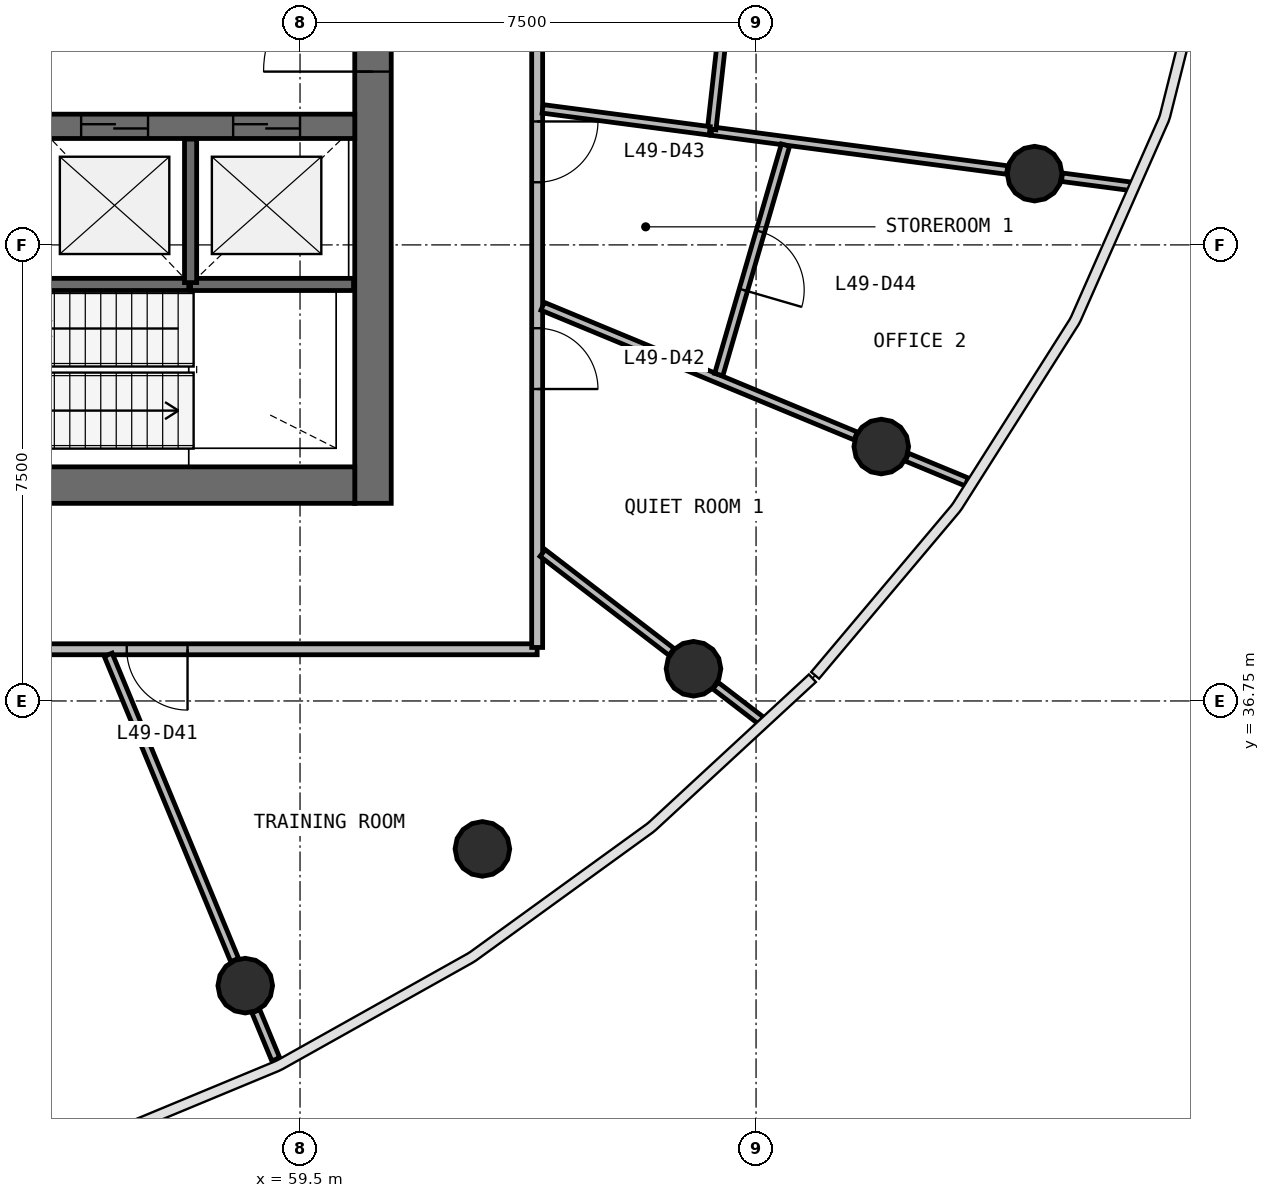
"""IFC4 building model, lengths in metres.
Left out: names, types, materials, properties, quantities, classifications, styles, units other than length and angle.
Written with IfcOpenShell. Run it as: python <this file> out.ifc"""

import sys

from ifc_helpers import new_model, si_unit, direction, frame, frame_2d, origin, origin_2d, place, context, subcontext, project, spatial, rectangle, circle, extrude, source, transform, mapped, element, fill, save


model = new_model("IFC4")
c1 = context("Model", 3, precision=1e-05, world=origin(), true_north=direction((0.0, 1.0)))
c2 = subcontext(c1, "Body", "Model", "MODEL_VIEW")
j1 = project(units=[si_unit("LENGTHUNIT", "METRE"), si_unit("PLANEANGLEUNIT", "RADIAN")], contexts=[c1])
p1 = place(None, origin())
s1 = spatial("IfcSite", under=j1, at=p1, CompositionType="ELEMENT")
p2 = place(p1, origin())
s2 = spatial("IfcBuilding", under=s1, at=p2, CompositionType="ELEMENT")
p3 = place(p2, frame((0.0, 0.0, 203.3)))
s3 = spatial("IfcBuildingStorey", under=s2, at=p3, CompositionType="ELEMENT", Elevation=203.3)
p4 = place(p3, frame((60.7, 40.0, 0.0), z_axis=(0.0, 0.0, 1.0), x_axis=(0.0, 1.0, 0.0)))
e1 = element("IfcWall", 1, at=p4, inside=s3, PredefinedType="SHEAR", context=c2, shape_type="SweptSolid", body=[
    extrude(rectangle(XDim=16.0, YDim=0.6, at=frame_2d((8.0, 0.0))), origin(), (0.0, 0.0, 1.0), 3.9),
])
p5 = place(p4, frame((7.1, 0.0, 0.0)))
e2 = element("IfcOpeningElement", 2, at=p5, cuts=e1, PredefinedType="OPENING", context=c2, shape_type="SweptSolid", body=[
    extrude(rectangle(XDim=1.8, YDim=2.1, at=frame_2d((0.9, 1.05))), frame((0.0, 0.31, 0.0), z_axis=(0.0, -1.0, 0.0), x_axis=(1.0, 0.0, 0.0)), (0.0, 0.0, 1.0), 0.62),
])
p6 = place(p3, frame((43.6, 40.3, 0.0), z_axis=(0.0, 0.0, 1.0), x_axis=(1.0, 0.0, 0.0)))
e3 = element("IfcWall", 3, at=p6, inside=s3, PredefinedType="SHEAR", context=c2, shape_type="SweptSolid", body=[
    extrude(rectangle(XDim=16.8, YDim=0.6, at=frame_2d((8.4, 0.0))), origin(), (0.0, 0.0, 1.0), 3.9),
])
p7 = place(p6, frame((10.3, 0.0, 0.0)))
e4 = element("IfcOpeningElement", 4, at=p7, cuts=e3, PredefinedType="OPENING", context=c2, shape_type="SweptSolid", body=[
    extrude(rectangle(XDim=1.2, YDim=2.1, at=frame_2d((0.6, 1.05))), frame((0.0, 0.31, 0.0), z_axis=(0.0, -1.0, 0.0), x_axis=(1.0, 0.0, 0.0)), (0.0, 0.0, 1.0), 0.62),
])
p8 = place(p6, frame((7.25, 0.0, 0.0)))
e5 = element("IfcOpeningElement", 5, at=p8, cuts=e3, PredefinedType="OPENING", context=c2, shape_type="SweptSolid", body=[
    extrude(rectangle(XDim=1.1, YDim=2.1, at=frame_2d((0.55, 1.05))), frame((0.0, 0.31, 0.0), z_axis=(0.0, -1.0, 0.0), x_axis=(1.0, 0.0, 0.0)), (0.0, 0.0, 1.0), 0.62),
])
p9 = place(p6, frame((0.7, 0.0, 0.0)))
e6 = element("IfcOpeningElement", 6, at=p9, cuts=e3, PredefinedType="OPENING", context=c2, shape_type="SweptSolid", body=[
    extrude(rectangle(XDim=0.8, YDim=2.1, at=frame_2d((0.4, 1.05))), frame((0.0, 0.31, 0.0), z_axis=(0.0, -1.0, 0.0), x_axis=(1.0, 0.0, 0.0)), (0.0, 0.0, 1.0), 0.62),
])
p10 = place(p3, frame((43.6, 46.2, 0.0), z_axis=(0.0, 0.0, 1.0), x_axis=(1.0, 0.0, 0.0)))
e7 = element("IfcWall", 7, at=p10, inside=s3, PredefinedType="SHEAR", context=c2, shape_type="SweptSolid", body=[
    extrude(rectangle(XDim=16.8, YDim=0.4, at=frame_2d((8.4, 0.0))), origin(), (0.0, 0.0, 1.0), 3.9),
])
p11 = place(p10, frame((9.8, 0.0, 0.0)))
e8 = element("IfcOpeningElement", 8, at=p11, cuts=e7, PredefinedType="OPENING", context=c2, shape_type="SweptSolid", body=[
    extrude(rectangle(XDim=1.1, YDim=2.1, at=frame_2d((0.55, 1.05))), frame((0.0, 0.21, 0.0), z_axis=(0.0, -1.0, 0.0), x_axis=(1.0, 0.0, 0.0)), (0.0, 0.0, 1.0), 0.42),
])
p12 = place(p10, frame((12.3, 0.0, 0.0)))
e9 = element("IfcOpeningElement", 9, at=p12, cuts=e7, PredefinedType="OPENING", context=c2, shape_type="SweptSolid", body=[
    extrude(rectangle(XDim=1.1, YDim=2.1, at=frame_2d((0.55, 1.05))), frame((0.0, 0.21, 0.0), z_axis=(0.0, -1.0, 0.0), x_axis=(1.0, 0.0, 0.0)), (0.0, 0.0, 1.0), 0.42),
])
p13 = place(p10, frame((14.8, 0.0, 0.0)))
e10 = element("IfcOpeningElement", 10, at=p13, cuts=e7, PredefinedType="OPENING", context=c2, shape_type="SweptSolid", body=[
    extrude(rectangle(XDim=1.1, YDim=2.1, at=frame_2d((0.55, 1.05))), frame((0.0, 0.21, 0.0), z_axis=(0.0, -1.0, 0.0), x_axis=(1.0, 0.0, 0.0)), (0.0, 0.0, 1.0), 0.42),
])
p14 = place(p10, frame((2.45, 0.0, 0.0)))
e11 = element("IfcOpeningElement", 11, at=p14, cuts=e7, PredefinedType="OPENING", context=c2, shape_type="SweptSolid", body=[
    extrude(rectangle(XDim=0.9, YDim=2.1, at=frame_2d((0.45, 1.05))), frame((0.0, 0.21, 0.0), z_axis=(0.0, -1.0, 0.0), x_axis=(1.0, 0.0, 0.0)), (0.0, 0.0, 1.0), 0.42),
])
p15 = place(p10, frame((7.85, 0.0, 0.0)))
e12 = element("IfcOpeningElement", 12, at=p15, cuts=e7, PredefinedType="OPENING", context=c2, shape_type="SweptSolid", body=[
    extrude(rectangle(XDim=0.9, YDim=2.1, at=frame_2d((0.45, 1.05))), frame((0.0, 0.21, 0.0), z_axis=(0.0, -1.0, 0.0), x_axis=(1.0, 0.0, 0.0)), (0.0, 0.0, 1.0), 0.42),
])
m1 = source(origin(), c2, "Body", "SweptSolid", [
    extrude(circle(Radius=0.45, at=origin_2d()), origin(), (0.0, 0.0, 1.0), 3.9),
])
for number, where, z_axis, x_axis in (
    (13, (58.599, 32.069, 0.0), (0.0, 0.0, 1.0), (1.0, 0.0, 0.0)),
    (14, (62.499, 34.317, 0.0), (0.0, 0.0, 1.0), (1.0, 0.0, 0.0)),
    (15, (65.971, 37.28, 0.0), (0.0, 0.0, 1.0), (1.0, 0.0, 0.0)),
    (16, (69.059, 40.934, 0.0), (0.0, 0.0, 1.0), (1.0, 0.0, 0.0)),
    (17, (71.581, 45.422, 0.0), (0.0, 0.0, 1.0), (1.0, 0.0, 0.0)),
):
    element("IfcColumn", number, at=place(p3, frame(where, z_axis=z_axis, x_axis=x_axis)), inside=s3, PredefinedType="COLUMN", context=c2, shape_type="MappedRepresentation", body=[
        mapped(m1, transform((0.0, 0.0, 0.0), scale=1.0)),
    ])
p16 = place(p3, frame((57.7, 43.6, 0.0), z_axis=(0.0, 0.0, 1.0), x_axis=(1.0, 0.0, 0.0)))
e18 = element("IfcWall", 18, at=p16, inside=s3, PredefinedType="SOLIDWALL", context=c2, shape_type="SweptSolid", body=[
    extrude(rectangle(XDim=2.68, YDim=0.2, at=frame_2d((1.34, 0.0))), origin(), (0.0, 0.0, 1.0), 3.58),
])
p17 = place(p3, frame((55.2, 43.6, 0.0), z_axis=(0.0, 0.0, 1.0), x_axis=(1.0, 0.0, 0.0)))
e19 = element("IfcWall", 19, at=p17, inside=s3, PredefinedType="SOLIDWALL", context=c2, shape_type="SweptSolid", body=[
    extrude(rectangle(XDim=2.47, YDim=0.2, at=frame_2d((1.235, 0.0))), origin(), (0.0, 0.0, 1.0), 3.58),
])
p18 = place(p3, frame((57.7, 43.63, 0.0), z_axis=(0.0, 0.0, 1.0), x_axis=(0.0, 1.0, 0.0)))
e20 = element("IfcWall", 20, at=p18, inside=s3, PredefinedType="SOLIDWALL", context=c2, shape_type="SweptSolid", body=[
    extrude(rectangle(XDim=2.36, YDim=0.2, at=frame_2d((1.18, 0.0))), origin(), (0.0, 0.0, 1.0), 3.58),
])
p19 = place(p3, frame((63.4, 37.6, 0.0), z_axis=(0.0, 0.0, 1.0), x_axis=(-1.0, 0.0, 0.0)))
e21 = element("IfcWall", 21, at=p19, inside=s3, PredefinedType="PARTITIONING", context=c2, shape_type="SweptSolid", body=[
    extrude(rectangle(XDim=22.8, YDim=0.18, at=frame_2d((11.4, 0.0))), origin(), (0.0, 0.0, 1.0), 2.88),
])
p20 = place(p19, frame((12.95, 0.0, 0.0)))
e22 = element("IfcOpeningElement", 22, at=p20, cuts=e21, PredefinedType="OPENING", context=c2, shape_type="SweptSolid", body=[
    extrude(rectangle(XDim=1.0, YDim=2.1, at=frame_2d((0.5, 1.05))), frame((0.0, 0.1, 0.0), z_axis=(0.0, -1.0, 0.0), x_axis=(1.0, 0.0, 0.0)), (0.0, 0.0, 1.0), 0.2),
])
p21 = place(p19, frame((10.95, 0.0, 0.0)))
e23 = element("IfcOpeningElement", 23, at=p21, cuts=e21, PredefinedType="OPENING", context=c2, shape_type="SweptSolid", body=[
    extrude(rectangle(XDim=1.0, YDim=2.1, at=frame_2d((0.5, 1.05))), frame((0.0, 0.1, 0.0), z_axis=(0.0, -1.0, 0.0), x_axis=(1.0, 0.0, 0.0)), (0.0, 0.0, 1.0), 0.2),
])
p22 = place(p19, frame((5.75, 0.0, 0.0)))
e24 = element("IfcOpeningElement", 24, at=p22, cuts=e21, PredefinedType="OPENING", context=c2, shape_type="SweptSolid", body=[
    extrude(rectangle(XDim=1.0, YDim=2.1, at=frame_2d((0.5, 1.05))), frame((0.0, 0.1, 0.0), z_axis=(0.0, -1.0, 0.0), x_axis=(1.0, 0.0, 0.0)), (0.0, 0.0, 1.0), 0.2),
])
p23 = place(p3, frame((63.4, 58.37, 0.0), z_axis=(0.0, 0.0, 1.0), x_axis=(0.0, -1.0, 0.0)))
e25 = element("IfcWall", 25, at=p23, inside=s3, PredefinedType="PARTITIONING", context=c2, shape_type="SweptSolid", body=[
    extrude(rectangle(XDim=20.74, YDim=0.18, at=frame_2d((10.37, 0.0))), origin(), (0.0, 0.0, 1.0), 2.88),
])
p24 = place(p23, frame((9.99, 0.0, 0.0)))
e26 = element("IfcOpeningElement", 26, at=p24, cuts=e25, PredefinedType="OPENING", context=c2, shape_type="SweptSolid", body=[
    extrude(rectangle(XDim=0.9, YDim=2.1, at=frame_2d((0.45, 1.05))), frame((0.0, 0.1, 0.0), z_axis=(0.0, -1.0, 0.0), x_axis=(1.0, 0.0, 0.0)), (0.0, 0.0, 1.0), 0.2),
])
p25 = place(p23, frame((7.79, 0.0, 0.0)))
e27 = element("IfcOpeningElement", 27, at=p25, cuts=e25, PredefinedType="OPENING", context=c2, shape_type="SweptSolid", body=[
    extrude(rectangle(XDim=0.9, YDim=2.1, at=frame_2d((0.45, 1.05))), frame((0.0, 0.1, 0.0), z_axis=(0.0, -1.0, 0.0), x_axis=(1.0, 0.0, 0.0)), (0.0, 0.0, 1.0), 0.2),
])
p26 = place(p23, frame((4.29, 0.0, 0.0)))
e28 = element("IfcOpeningElement", 28, at=p26, cuts=e25, PredefinedType="OPENING", context=c2, shape_type="SweptSolid", body=[
    extrude(rectangle(XDim=1.0, YDim=2.1, at=frame_2d((0.5, 1.05))), frame((0.0, 0.1, 0.0), z_axis=(0.0, -1.0, 0.0), x_axis=(1.0, 0.0, 0.0)), (0.0, 0.0, 1.0), 0.2),
])
p27 = place(p23, frame((15.49, 0.0, 0.0)))
e29 = element("IfcOpeningElement", 29, at=p27, cuts=e25, PredefinedType="OPENING", context=c2, shape_type="SweptSolid", body=[
    extrude(rectangle(XDim=1.0, YDim=2.1, at=frame_2d((0.5, 1.05))), frame((0.0, 0.1, 0.0), z_axis=(0.0, -1.0, 0.0), x_axis=(1.0, 0.0, 0.0)), (0.0, 0.0, 1.0), 0.2),
])
p28 = place(p23, frame((12.09, 0.0, 0.0)))
e30 = element("IfcOpeningElement", 30, at=p28, cuts=e25, PredefinedType="OPENING", context=c2, shape_type="SweptSolid", body=[
    extrude(rectangle(XDim=1.0, YDim=2.1, at=frame_2d((0.5, 1.05))), frame((0.0, 0.1, 0.0), z_axis=(0.0, -1.0, 0.0), x_axis=(1.0, 0.0, 0.0)), (0.0, 0.0, 1.0), 0.2),
])
p29 = place(p3, frame((68.639, 41.108, 0.0), z_axis=(0.0, 0.0, 1.0), x_axis=(-0.9238758778, 0.382692255499, 0.0)))
e31 = element("IfcWall", 31, at=p29, inside=s3, PredefinedType="PARTITIONING", context=c2, shape_type="SweptSolid", body=[
    extrude(rectangle(XDim=5.573, YDim=0.14, at=frame_2d((2.787, 0.0))), origin(), (0.0, 0.0, 1.0), 2.88),
])
p30 = place(p3, frame((56.345, 37.51, 0.0), z_axis=(0.0, 0.0, 1.0), x_axis=(0.382655972885, -0.923890906122, 0.0)))
e32 = element("IfcWall", 32, at=p30, inside=s3, PredefinedType="PARTITIONING", context=c2, shape_type="SweptSolid", body=[
    extrude(rectangle(XDim=5.435, YDim=0.14, at=frame_2d((2.717, 0.0))), origin(), (0.0, 0.0, 1.0), 2.88),
])
p31 = place(p3, frame((66.267, 46.122, 0.0), z_axis=(0.0, 0.0, 1.0), x_axis=(0.991448195842, -0.130500861923, 0.0)))
e33 = element("IfcWall", 33, at=p31, inside=s3, PredefinedType="PARTITIONING", context=c2, shape_type="SweptSolid", body=[
    extrude(rectangle(XDim=4.905, YDim=0.14, at=frame_2d((2.453, 0.0))), origin(), (0.0, 0.0, 1.0), 2.88),
])
p32 = place(p3, frame((67.484, 45.891, 0.0), z_axis=(0.0, 0.0, 1.0), x_axis=(-0.279262901939, -0.960214679955, 0.0)))
e34 = element("IfcWall", 34, at=p32, inside=s3, PredefinedType="PARTITIONING", context=c2, shape_type="SweptSolid", body=[
    extrude(rectangle(XDim=3.931, YDim=0.14, at=frame_2d((1.965, 0.0))), origin(), (0.0, 0.0, 1.0), 2.88),
])
p33 = place(p32, frame((1.481, 0.0, 0.0)))
e35 = element("IfcOpeningElement", 35, at=p33, cuts=e34, PredefinedType="OPENING", context=c2, shape_type="SweptSolid", body=[
    extrude(rectangle(XDim=1.0, YDim=2.1, at=frame_2d((0.5, 1.05))), frame((0.0, 0.08, 0.0), z_axis=(0.0, -1.0, 0.0), x_axis=(1.0, 0.0, 0.0)), (0.0, 0.0, 1.0), 0.16),
])
p34 = place(p3, frame((66.271, 46.152, 0.0), z_axis=(0.0, 0.0, 1.0), x_axis=(0.111758070994, 0.993735444456, 0.0)))
e36 = element("IfcWall", 36, at=p34, inside=s3, PredefinedType="PARTITIONING", context=c2, shape_type="SweptSolid", body=[
    extrude(rectangle(XDim=3.777, YDim=0.14, at=frame_2d((1.889, 0.0))), origin(), (0.0, 0.0, 1.0), 2.88),
])
p35 = place(p3, frame((63.49, 46.487, 0.0), z_axis=(0.0, 0.0, 1.0), x_axis=(0.991438994906, -0.13057074473, 0.0)))
e37 = element("IfcWall", 37, at=p35, inside=s3, PredefinedType="PARTITIONING", context=c2, shape_type="SweptSolid", body=[
    extrude(rectangle(XDim=2.771, YDim=0.14, at=frame_2d((1.385, 0.0))), origin(), (0.0, 0.0, 1.0), 2.88),
])
p36 = place(p3, frame((63.49, 39.183, 0.0), z_axis=(0.0, 0.0, 1.0), x_axis=(0.793363703091, -0.608747923707, 0.0)))
e38 = element("IfcWall", 38, at=p36, inside=s3, PredefinedType="PARTITIONING", context=c2, shape_type="SweptSolid", body=[
    extrude(rectangle(XDim=2.673, YDim=0.14, at=frame_2d((1.336, 0.0))), origin(), (0.0, 0.0, 1.0), 2.88),
])
p37 = place(p3, frame((72.031, 45.363, 0.0), z_axis=(0.0, 0.0, 1.0), x_axis=(0.99143621724, -0.130591834141, 0.0)))
e39 = element("IfcWall", 39, at=p37, inside=s3, PredefinedType="PARTITIONING", context=c2, shape_type="SweptSolid", body=[
    extrude(rectangle(XDim=1.15, YDim=0.14, at=frame_2d((0.575, 0.0))), origin(), (0.0, 0.0, 1.0), 2.88),
])
p38 = place(p3, frame((70.464, 40.352, 0.0), z_axis=(0.0, 0.0, 1.0), x_axis=(-0.923921911664, 0.382581104012, 0.0)))
e40 = element("IfcWall", 40, at=p38, inside=s3, PredefinedType="PARTITIONING", context=c2, shape_type="SweptSolid", body=[
    extrude(rectangle(XDim=1.066, YDim=0.14, at=frame_2d((0.533, 0.0))), origin(), (0.0, 0.0, 1.0), 2.88),
])
p39 = place(p3, frame((66.332, 37.003, 0.0), z_axis=(0.0, 0.0, 1.0), x_axis=(0.793344167197, -0.608773383431, 0.0)))
e41 = element("IfcWall", 41, at=p39, inside=s3, PredefinedType="PARTITIONING", context=c2, shape_type="SweptSolid", body=[
    extrude(rectangle(XDim=0.944, YDim=0.14, at=frame_2d((0.472, 0.0))), origin(), (0.0, 0.0, 1.0), 2.88),
])
p40 = place(p3, frame((58.773, 31.648, 0.0), z_axis=(0.0, 0.0, 1.0), x_axis=(0.382754217383, -0.92385020922, 0.0)))
e42 = element("IfcWall", 42, at=p40, inside=s3, PredefinedType="PARTITIONING", context=c2, shape_type="SweptSolid", body=[
    extrude(rectangle(XDim=0.857, YDim=0.14, at=frame_2d((0.429, 0.0))), origin(), (0.0, 0.0, 1.0), 2.88),
])
m2 = source(origin(), c2, "Body", "SweptSolid", [
    extrude(rectangle(XDim=1.8, YDim=2.1, at=frame_2d((0.9, 1.05))), frame((0.0, 0.025, 0.0), z_axis=(0.0, -1.0, 0.0), x_axis=(1.0, 0.0, 0.0)), (0.0, 0.0, 1.0), 0.05),
])
p41 = place(p5, origin())
e43 = element("IfcDoor", 43, at=p41, inside=s3, OperationType="SINGLE_SWING_LEFT", PredefinedType="DOOR", context=c2, shape_type="MappedRepresentation", body=[
    mapped(m2, transform((0.0, 0.0, 0.0), scale=1.0)),
])
fill(e2, e43)
m3 = source(origin(), c2, "Body", "SweptSolid", [
    extrude(rectangle(XDim=1.1, YDim=2.1, at=frame_2d((0.55, 1.05))), frame((0.0, 0.025, 0.0), z_axis=(0.0, -1.0, 0.0), x_axis=(1.0, 0.0, 0.0)), (0.0, 0.0, 1.0), 0.05),
])
p42 = place(p12, origin())
e44 = element("IfcDoor", 44, at=p42, inside=s3, OperationType="DOUBLE_DOOR_SLIDING", PredefinedType="USERDEFINED", context=c2, shape_type="MappedRepresentation", body=[
    mapped(m3, transform((0.0, 0.0, 0.0), scale=1.0)),
])
fill(e9, e44)
p43 = place(p13, origin())
e45 = element("IfcDoor", 45, at=p43, inside=s3, OperationType="DOUBLE_DOOR_SLIDING", PredefinedType="USERDEFINED", context=c2, shape_type="MappedRepresentation", body=[
    mapped(m3, transform((0.0, 0.0, 0.0), scale=1.0)),
])
fill(e10, e45)
m4 = source(origin(), c2, "Body", "SweptSolid", [
    extrude(rectangle(XDim=1.0, YDim=2.1, at=frame_2d((0.5, 1.05))), frame((0.0, 0.025, 0.0), z_axis=(0.0, -1.0, 0.0), x_axis=(1.0, 0.0, 0.0)), (0.0, 0.0, 1.0), 0.05),
])
p44 = place(p22, origin())
e46 = element("IfcDoor", 46, at=p44, inside=s3, OperationType="SINGLE_SWING_LEFT", PredefinedType="DOOR", context=c2, shape_type="MappedRepresentation", body=[
    mapped(m4, transform((0.0, 0.0, 0.0), scale=1.0)),
])
fill(e24, e46)
p45 = place(p27, origin())
e47 = element("IfcDoor", 47, at=p45, inside=s3, OperationType="SINGLE_SWING_RIGHT", PredefinedType="DOOR", context=c2, shape_type="MappedRepresentation", body=[
    mapped(m4, transform((0.0, 0.0, 0.0), scale=1.0)),
])
fill(e29, e47)
p46 = place(p28, origin())
e48 = element("IfcDoor", 48, at=p46, inside=s3, OperationType="SINGLE_SWING_LEFT", PredefinedType="DOOR", context=c2, shape_type="MappedRepresentation", body=[
    mapped(m4, transform((0.0, 0.0, 0.0), scale=1.0)),
])
fill(e30, e48)
p47 = place(p33, origin())
e49 = element("IfcDoor", 49, at=p47, inside=s3, OperationType="SINGLE_SWING_RIGHT", PredefinedType="DOOR", context=c2, shape_type="MappedRepresentation", body=[
    mapped(m4, transform((0.0, 0.0, 0.0), scale=1.0)),
])
fill(e35, e49)
save(model, sys.argv[1])
